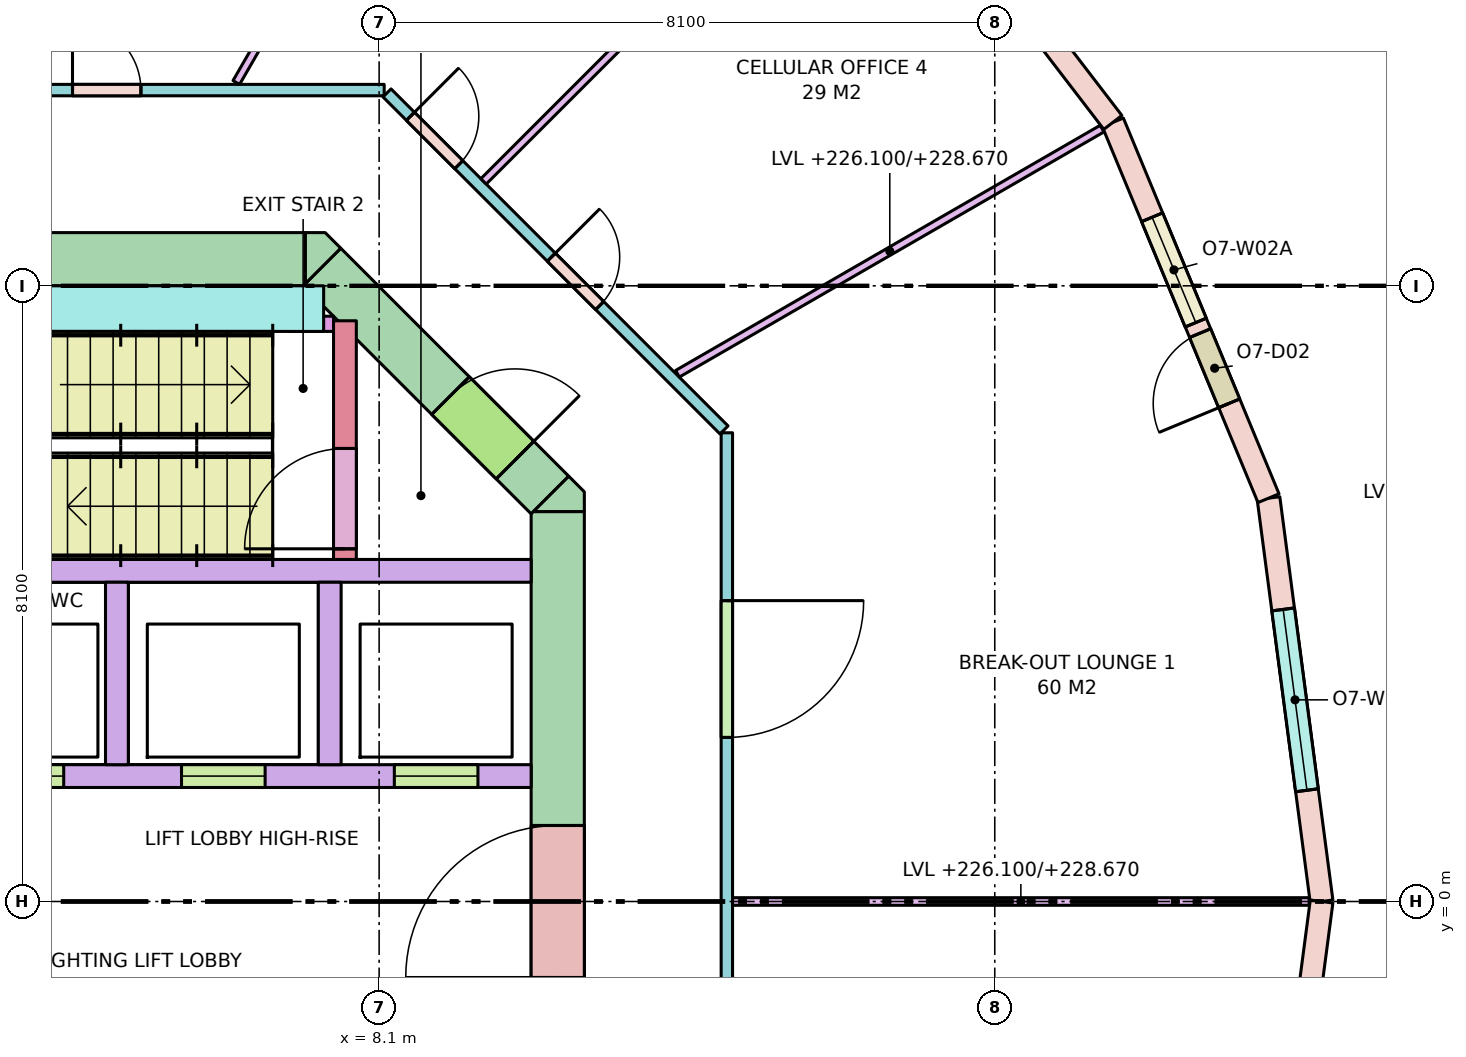
"""IFC4 building model, lengths in metres.
Left out: names, types, materials, properties, quantities, classifications, styles, units other than length and angle.
Written with IfcOpenShell. Run it as: python <this file> out.ifc"""

import sys

from ifc_helpers import new_model, si_unit, direction, frame, frame_2d, origin, place, context, subcontext, project, spatial, polyline, rectangle, outline, extrude, element, fill, save


model = new_model("IFC4")
c1 = context("Model", 3, precision=1e-05, world=origin(), true_north=direction((0.0, 1.0)))
c2 = subcontext(c1, "Body", "Model", "MODEL_VIEW")
j1 = project(units=[si_unit("LENGTHUNIT", "METRE"), si_unit("PLANEANGLEUNIT", "RADIAN")], contexts=[c1])
p1 = place(None, origin())
s1 = spatial("IfcSite", under=j1, at=p1, CompositionType="ELEMENT")
p2 = place(p1, origin())
s2 = spatial("IfcBuilding", under=s1, at=p2, CompositionType="ELEMENT")
p3 = place(p2, frame((0.0, 0.0, 226.1)))
s3 = spatial("IfcBuildingStorey", under=s2, at=p3, CompositionType="ELEMENT", Elevation=226.1)
p4 = place(p3, frame((-7.13, 8.45, -0.28), z_axis=(0.0, 0.0, 1.0), x_axis=(1.0, 0.0, 0.0)))
e1 = element("IfcWall", 1, at=p4, inside=s3, PredefinedType="SHEAR", context=c2, shape_type="SweptSolid", body=[
    extrude(rectangle(XDim=14.26, YDim=0.7, at=frame_2d((7.13, 0.0))), origin(), (0.0, 0.0, 1.0), 3.7),
])
p5 = place(p4, frame((5.48, 0.0, 0.28)))
e2 = element("IfcOpeningElement", 2, at=p5, cuts=e1, PredefinedType="OPENING", context=c2, shape_type="SweptSolid", body=[
    extrude(rectangle(XDim=0.7, YDim=2.1, at=frame_2d((0.35, 1.05))), frame((0.0, 0.36, 0.0), z_axis=(0.0, -1.0, 0.0), x_axis=(1.0, 0.0, 0.0)), (0.0, 0.0, 1.0), 0.72),
])
p6 = place(p4, frame((7.155, 0.0, 0.28)))
e3 = element("IfcOpeningElement", 3, at=p6, cuts=e1, PredefinedType="OPENING", context=c2, shape_type="SweptSolid", body=[
    extrude(rectangle(XDim=0.9, YDim=2.1, at=frame_2d((0.45, 1.05))), frame((0.0, 0.36, 0.0), z_axis=(0.0, -1.0, 0.0), x_axis=(1.0, 0.0, 0.0)), (0.0, 0.0, 1.0), 0.72),
])
p7 = place(p3, frame((10.45, -5.13, -0.28), z_axis=(0.0, 0.0, 1.0), x_axis=(0.0, 1.0, 0.0)))
e4 = element("IfcWall", 4, at=p7, inside=s3, PredefinedType="SHEAR", context=c2, shape_type="SweptSolid", body=[
    extrude(rectangle(XDim=10.26, YDim=0.7, at=frame_2d((5.13, 0.0))), origin(), (0.0, 0.0, 1.0), 3.7),
])
p8 = place(p7, frame((4.13, 0.0, 0.28)))
e5 = element("IfcOpeningElement", 5, at=p8, cuts=e4, PredefinedType="OPENING", context=c2, shape_type="SweptSolid", body=[
    extrude(rectangle(XDim=2.0, YDim=2.1, at=frame_2d((1.0, 1.05))), frame((0.0, 0.36, 0.0), z_axis=(0.0, -1.0, 0.0), x_axis=(1.0, 0.0, 0.0)), (0.0, 0.0, 1.0), 0.72),
])
p9 = place(p3, frame((7.347, 8.347, -0.28), z_axis=(0.0, 0.0, 1.0), x_axis=(0.707106781187, -0.707106781187, 0.0)))
e6 = element("IfcWall", 6, at=p9, inside=s3, PredefinedType="SHEAR", context=c2, shape_type="SweptSolid", body=[
    extrude(rectangle(XDim=4.243, YDim=0.7, at=frame_2d((2.121, 0.0))), origin(), (0.0, 0.0, 1.0), 3.7),
])
p10 = place(p9, frame((2.393, 0.0, 0.28)))
e7 = element("IfcOpeningElement", 7, at=p10, cuts=e6, PredefinedType="OPENING", context=c2, shape_type="SweptSolid", body=[
    extrude(rectangle(XDim=1.2, YDim=2.1, at=frame_2d((0.6, 1.05))), frame((0.0, 0.36, 0.0), z_axis=(0.0, -1.0, 0.0), x_axis=(1.0, 0.0, 0.0)), (0.0, 0.0, 1.0), 0.72),
])
p11 = place(p3, frame((0.0, 0.0, -0.28)))
e8 = element("IfcWall", 8, at=p11, inside=s3, PredefinedType="SHEAR", context=c2, shape_type="SweptSolid", body=[
    extrude(outline(polyline([(10.8, 5.39), (10.8, 5.13), (10.8, 5.13), (10.13, 5.13), (10.595, 5.595), (10.595, 5.595), (10.595, 5.595), (10.8, 5.39)])), origin(), (0.0, 0.0, 1.0), 3.7),
])
p12 = place(p3, frame((0.0, 0.0, -0.28)))
e9 = element("IfcWall", 9, at=p12, inside=s3, PredefinedType="SHEAR", context=c2, shape_type="SweptSolid", body=[
    extrude(outline(polyline([(7.39, 8.8), (7.595, 8.595), (7.595, 8.595), (7.595, 8.595), (7.13, 8.13), (7.13, 8.8), (7.13, 8.8), (7.39, 8.8)])), origin(), (0.0, 0.0, 1.0), 3.7),
])
p13 = place(p3, frame((2.0, 4.35, 0.0), z_axis=(0.0, 0.0, 1.0), x_axis=(1.0, 0.0, 0.0)))
e10 = element("IfcWall", 10, at=p13, inside=s3, PredefinedType="SOLIDWALL", context=c2, shape_type="SweptSolid", body=[
    extrude(rectangle(XDim=8.1, YDim=0.3, at=frame_2d((4.05, 0.0))), origin(), (0.0, 0.0, 1.0), 3.42),
])
p14 = place(p3, frame((2.0, 1.65, 0.0), z_axis=(0.0, 0.0, 1.0), x_axis=(1.0, 0.0, 0.0)))
e11 = element("IfcWall", 11, at=p14, inside=s3, PredefinedType="SOLIDWALL", context=c2, shape_type="SweptSolid", body=[
    extrude(rectangle(XDim=8.1, YDim=0.3, at=frame_2d((4.05, 0.0))), origin(), (0.0, 0.0, 1.0), 3.42),
])
p15 = place(p14, frame((0.85, 0.0, 0.0)))
e12 = element("IfcOpeningElement", 12, at=p15, cuts=e11, PredefinedType="OPENING", context=c2, shape_type="SweptSolid", body=[
    extrude(rectangle(XDim=1.1, YDim=2.1, at=frame_2d((0.55, 1.05))), frame((0.0, 0.16, 0.0), z_axis=(0.0, -1.0, 0.0), x_axis=(1.0, 0.0, 0.0)), (0.0, 0.0, 1.0), 0.32),
])
p16 = place(p14, frame((3.5, 0.0, 0.0)))
e13 = element("IfcOpeningElement", 13, at=p16, cuts=e11, PredefinedType="OPENING", context=c2, shape_type="SweptSolid", body=[
    extrude(rectangle(XDim=1.1, YDim=2.1, at=frame_2d((0.55, 1.05))), frame((0.0, 0.16, 0.0), z_axis=(0.0, -1.0, 0.0), x_axis=(1.0, 0.0, 0.0)), (0.0, 0.0, 1.0), 0.32),
])
p17 = place(p14, frame((6.3, 0.0, 0.0)))
e14 = element("IfcOpeningElement", 14, at=p17, cuts=e11, PredefinedType="OPENING", context=c2, shape_type="SweptSolid", body=[
    extrude(rectangle(XDim=1.1, YDim=2.1, at=frame_2d((0.55, 1.05))), frame((0.0, 0.16, 0.0), z_axis=(0.0, -1.0, 0.0), x_axis=(1.0, 0.0, 0.0)), (0.0, 0.0, 1.0), 0.32),
])
for number, where, z_axis, x_axis in (
    (15, (4.65, 1.8, 0.0), (0.0, 0.0, 1.0), (0.0, 1.0, 0.0)),
    (16, (7.45, 1.8, 0.0), (0.0, 0.0, 1.0), (0.0, 1.0, 0.0)),
):
    element("IfcWall", number, at=place(p3, frame(where, z_axis=z_axis, x_axis=x_axis)), inside=s3, PredefinedType="SOLIDWALL", context=c2, shape_type="SweptSolid", body=[
        extrude(rectangle(XDim=2.4, YDim=0.3, at=frame_2d((1.2, 0.0))), origin(), (0.0, 0.0, 1.0), 3.42),
    ])
p18 = place(p3, frame((7.65, 4.5, 0.0), z_axis=(0.0, 0.0, 1.0), x_axis=(0.0, 1.0, 0.0)))
e17 = element("IfcWall", 17, at=p18, inside=s3, PredefinedType="SHEAR", context=c2, shape_type="SweptSolid", body=[
    extrude(rectangle(XDim=3.14, YDim=0.3, at=frame_2d((1.57, 0.0))), origin(), (0.0, 0.0, 1.0), 3.42),
])
p19 = place(p18, frame((0.14, 0.0, 0.0)))
e18 = element("IfcOpeningElement", 18, at=p19, cuts=e17, PredefinedType="OPENING", context=c2, shape_type="SweptSolid", body=[
    extrude(rectangle(XDim=1.32, YDim=2.1, at=frame_2d((0.66, 1.05))), frame((0.0, 0.16, 0.0), z_axis=(0.0, -1.0, 0.0), x_axis=(1.0, 0.0, 0.0)), (0.0, 0.0, 1.0), 0.32),
])
p20 = place(p3, frame((2.0, 7.8, 0.0), z_axis=(0.0, 0.0, 1.0), x_axis=(1.0, 0.0, 0.0)))
e19 = element("IfcWall", 19, at=p20, inside=s3, PredefinedType="SHEAR", context=c2, shape_type="SweptSolid", body=[
    extrude(rectangle(XDim=5.37, YDim=0.6, at=frame_2d((2.685, 0.0))), origin(), (0.0, 0.0, 1.0), 3.42),
])
p21 = place(p3, frame((6.9, 7.6, 0.0), z_axis=(0.0, 0.0, 1.0), x_axis=(1.0, 0.0, 0.0)))
e20 = element("IfcWall", 20, at=p21, inside=s3, PredefinedType="SHEAR", context=c2, shape_type="SweptSolid", body=[
    extrude(rectangle(XDim=0.6, YDim=0.2, at=frame_2d((0.3, 0.0))), origin(), (0.0, 0.0, 1.0), 3.42),
])
p22 = place(p3, frame((20.5, 0.0, 0.0), z_axis=(0.0, 0.0, 1.0), x_axis=(-0.130517056518, 0.991446064069, 0.0)))
e21 = element("IfcWall", 21, at=p22, inside=s3, PredefinedType="STANDARD", context=c2, shape_type="SweptSolid", body=[
    extrude(rectangle(XDim=5.352, YDim=0.3, at=frame_2d((2.676, 0.0))), origin(), (0.0, 0.0, 1.0), 3.42),
])
p23 = place(p22, frame((1.476, 0.0, 0.8)))
e22 = element("IfcOpeningElement", 22, at=p23, cuts=e21, PredefinedType="OPENING", context=c2, shape_type="SweptSolid", body=[
    extrude(rectangle(XDim=2.4, YDim=2.4, at=frame_2d((1.2, 1.2))), frame((0.0, 0.16, 0.0), z_axis=(0.0, -1.0, 0.0), x_axis=(1.0, 0.0, 0.0)), (0.0, 0.0, 1.0), 0.32),
])
p24 = place(p3, frame((19.802, 5.306, 0.0), z_axis=(0.0, 0.0, 1.0), x_axis=(-0.382713071139, 0.923867255172, 0.0)))
e23 = element("IfcWall", 23, at=p24, inside=s3, PredefinedType="STANDARD", context=c2, shape_type="SweptSolid", body=[
    extrude(rectangle(XDim=5.352, YDim=0.3, at=frame_2d((2.676, 0.0))), origin(), (0.0, 0.0, 1.0), 3.42),
])
p25 = place(p24, frame((1.351, 0.0, 0.0)))
e24 = element("IfcOpeningElement", 24, at=p25, cuts=e23, PredefinedType="OPENING", context=c2, shape_type="SweptSolid", body=[
    extrude(rectangle(XDim=1.0, YDim=2.4, at=frame_2d((0.5, 1.2))), frame((0.0, 0.16, 0.0), z_axis=(0.0, -1.0, 0.0), x_axis=(1.0, 0.0, 0.0)), (0.0, 0.0, 1.0), 0.32),
])
p26 = place(p24, frame((2.501, 0.0, 0.8)))
e25 = element("IfcOpeningElement", 25, at=p26, cuts=e23, PredefinedType="OPENING", context=c2, shape_type="SweptSolid", body=[
    extrude(rectangle(XDim=1.5, YDim=2.4, at=frame_2d((0.75, 1.2))), frame((0.0, 0.16, 0.0), z_axis=(0.0, -1.0, 0.0), x_axis=(1.0, 0.0, 0.0)), (0.0, 0.0, 1.0), 0.32),
])
p27 = place(p3, frame((17.753, 10.25, 0.0), z_axis=(0.0, 0.0, 1.0), x_axis=(-0.60876670321, 0.793349293227, 0.0)))
e26 = element("IfcWall", 26, at=p27, inside=s3, PredefinedType="STANDARD", context=c2, shape_type="SweptSolid", body=[
    extrude(rectangle(XDim=5.352, YDim=0.3, at=frame_2d((2.676, 0.0))), origin(), (0.0, 0.0, 1.0), 3.42),
])
p28 = place(p27, frame((1.476, 0.0, 0.8)))
e27 = element("IfcOpeningElement", 27, at=p28, cuts=e26, PredefinedType="OPENING", context=c2, shape_type="SweptSolid", body=[
    extrude(rectangle(XDim=2.4, YDim=2.4, at=frame_2d((1.2, 1.2))), frame((0.0, 0.16, 0.0), z_axis=(0.0, -1.0, 0.0), x_axis=(1.0, 0.0, 0.0)), (0.0, 0.0, 1.0), 0.32),
])
p29 = place(p3, frame((19.802, -5.306, 0.0), z_axis=(0.0, 0.0, 1.0), x_axis=(0.130517056518, 0.991446064069, 0.0)))
e28 = element("IfcWall", 28, at=p29, inside=s3, PredefinedType="STANDARD", context=c2, shape_type="SweptSolid", body=[
    extrude(rectangle(XDim=5.352, YDim=0.3, at=frame_2d((2.676, 0.0))), origin(), (0.0, 0.0, 1.0), 3.42),
])
p30 = place(p29, frame((1.351, 0.0, 0.0)))
e29 = element("IfcOpeningElement", 29, at=p30, cuts=e28, PredefinedType="OPENING", context=c2, shape_type="SweptSolid", body=[
    extrude(rectangle(XDim=1.0, YDim=2.4, at=frame_2d((0.5, 1.2))), frame((0.0, 0.16, 0.0), z_axis=(0.0, -1.0, 0.0), x_axis=(1.0, 0.0, 0.0)), (0.0, 0.0, 1.0), 0.32),
])
p31 = place(p29, frame((2.501, 0.0, 0.8)))
e30 = element("IfcOpeningElement", 30, at=p31, cuts=e28, PredefinedType="OPENING", context=c2, shape_type="SweptSolid", body=[
    extrude(rectangle(XDim=1.5, YDim=2.4, at=frame_2d((0.75, 1.2))), frame((0.0, 0.16, 0.0), z_axis=(0.0, -1.0, 0.0), x_axis=(1.0, 0.0, 0.0)), (0.0, 0.0, 1.0), 0.32),
])
p32 = place(p3, frame((0.0, 10.675, 0.0), z_axis=(0.0, 0.0, 1.0), x_axis=(1.0, 0.0, 0.0)))
e31 = element("IfcWall", 31, at=p32, inside=s3, PredefinedType="PARTITIONING", context=c2, shape_type="SweptSolid", body=[
    extrude(rectangle(XDim=8.167, YDim=0.15, at=frame_2d((4.083, 0.0))), origin(), (0.0, 0.0, 1.0), 2.57),
])
p33 = place(p32, frame((4.066, 0.0, 0.0)))
e32 = element("IfcOpeningElement", 32, at=p33, cuts=e31, PredefinedType="OPENING", context=c2, shape_type="SweptSolid", body=[
    extrude(rectangle(XDim=0.9, YDim=2.1, at=frame_2d((0.45, 1.05))), frame((0.0, 0.085, 0.0), z_axis=(0.0, -1.0, 0.0), x_axis=(1.0, 0.0, 0.0)), (0.0, 0.0, 1.0), 0.17),
])
p34 = place(p32, frame((1.006, 0.0, 0.0)))
e33 = element("IfcOpeningElement", 33, at=p34, cuts=e31, PredefinedType="OPENING", context=c2, shape_type="SweptSolid", body=[
    extrude(rectangle(XDim=0.9, YDim=2.1, at=frame_2d((0.45, 1.05))), frame((0.0, 0.085, 0.0), z_axis=(0.0, -1.0, 0.0), x_axis=(1.0, 0.0, 0.0)), (0.0, 0.0, 1.0), 0.17),
])
p35 = place(p3, frame((8.204, 10.638, 0.0), z_axis=(0.0, 0.0, 1.0), x_axis=(0.707106781187, -0.707106781187, 0.0)))
e34 = element("IfcWall", 34, at=p35, inside=s3, PredefinedType="PARTITIONING", context=c2, shape_type="SweptSolid", body=[
    extrude(rectangle(XDim=6.271, YDim=0.15, at=frame_2d((3.135, 0.0))), origin(), (0.0, 0.0, 1.0), 2.57),
])
p36 = place(p35, frame((3.057, 0.0, 0.0)))
e35 = element("IfcOpeningElement", 35, at=p36, cuts=e34, PredefinedType="OPENING", context=c2, shape_type="SweptSolid", body=[
    extrude(rectangle(XDim=0.9, YDim=2.1, at=frame_2d((0.45, 1.05))), frame((0.0, 0.085, 0.0), z_axis=(0.0, -1.0, 0.0), x_axis=(1.0, 0.0, 0.0)), (0.0, 0.0, 1.0), 0.17),
])
p37 = place(p35, frame((0.436, 0.0, 0.0)))
e36 = element("IfcOpeningElement", 36, at=p37, cuts=e34, PredefinedType="OPENING", context=c2, shape_type="SweptSolid", body=[
    extrude(rectangle(XDim=0.9, YDim=2.1, at=frame_2d((0.45, 1.05))), frame((0.0, 0.085, 0.0), z_axis=(0.0, -1.0, 0.0), x_axis=(1.0, 0.0, 0.0)), (0.0, 0.0, 1.0), 0.17),
])
p38 = place(p3, frame((12.675, 6.167, 0.0), z_axis=(0.0, 0.0, 1.0), x_axis=(0.0, -1.0, 0.0)))
e37 = element("IfcWall", 37, at=p38, inside=s3, PredefinedType="PARTITIONING", context=c2, shape_type="SweptSolid", body=[
    extrude(rectangle(XDim=12.333, YDim=0.15, at=frame_2d((6.167, 0.0))), origin(), (0.0, 0.0, 1.0), 2.57),
])
p39 = place(p38, frame((10.473, 0.0, 0.0)))
e38 = element("IfcOpeningElement", 38, at=p39, cuts=e37, PredefinedType="OPENING", context=c2, shape_type="SweptSolid", body=[
    extrude(rectangle(XDim=0.9, YDim=2.1, at=frame_2d((0.45, 1.05))), frame((0.0, 0.085, 0.0), z_axis=(0.0, -1.0, 0.0), x_axis=(1.0, 0.0, 0.0)), (0.0, 0.0, 1.0), 0.17),
])
p40 = place(p38, frame((7.416, 0.0, 0.0)))
e39 = element("IfcOpeningElement", 39, at=p40, cuts=e37, PredefinedType="OPENING", context=c2, shape_type="SweptSolid", body=[
    extrude(rectangle(XDim=0.9, YDim=2.1, at=frame_2d((0.45, 1.05))), frame((0.0, 0.085, 0.0), z_axis=(0.0, -1.0, 0.0), x_axis=(1.0, 0.0, 0.0)), (0.0, 0.0, 1.0), 0.17),
])
p41 = place(p38, frame((2.208, 0.0, 0.0)))
e40 = element("IfcOpeningElement", 40, at=p41, cuts=e37, PredefinedType="OPENING", context=c2, shape_type="SweptSolid", body=[
    extrude(rectangle(XDim=1.8, YDim=2.1, at=frame_2d((0.9, 1.05))), frame((0.0, 0.085, 0.0), z_axis=(0.0, -1.0, 0.0), x_axis=(1.0, 0.0, 0.0)), (0.0, 0.0, 1.0), 0.17),
])
p42 = place(p3, frame((12.75, 0.0, 0.0), z_axis=(0.0, 0.0, 1.0), x_axis=(1.0, 0.0, 0.0)))
e41 = element("IfcWall", 41, at=p42, inside=s3, PredefinedType="PARTITIONING", context=c2, shape_type="SweptSolid", body=[
    extrude(rectangle(XDim=7.587, YDim=0.1, at=frame_2d((3.793, 0.0))), origin(), (0.0, 0.0, 1.0), 2.57),
])
p43 = place(p3, frame((12.025, 6.943, 0.0), z_axis=(0.0, 0.0, 1.0), x_axis=(0.866026773083, 0.499997628298, 0.0)))
e42 = element("IfcWall", 42, at=p43, inside=s3, PredefinedType="PARTITIONING", context=c2, shape_type="SweptSolid", body=[
    extrude(rectangle(XDim=6.451, YDim=0.1, at=frame_2d((3.226, 0.0))), origin(), (0.0, 0.0, 1.0), 2.57),
])
p44 = place(p3, frame((9.474, 9.474, 0.0), z_axis=(0.0, 0.0, 1.0), x_axis=(0.707106781187, 0.707106781187, 0.0)))
e43 = element("IfcWall", 43, at=p44, inside=s3, PredefinedType="PARTITIONING", context=c2, shape_type="SweptSolid", body=[
    extrude(rectangle(XDim=6.938, YDim=0.1, at=frame_2d((3.469, 0.0))), origin(), (0.0, 0.0, 1.0), 2.57),
])
p45 = place(p3, frame((6.221, 10.775, 0.0), z_axis=(0.0, 0.0, 1.0), x_axis=(0.500016891966, 0.866015650984, 0.0)))
e44 = element("IfcWall", 44, at=p45, inside=s3, PredefinedType="PARTITIONING", context=c2, shape_type="SweptSolid", body=[
    extrude(rectangle(XDim=7.895, YDim=0.1, at=frame_2d((3.948, 0.0))), origin(), (0.0, 0.0, 1.0), 2.57),
])
p46 = place(p3, frame((2.884, 10.764, 0.0), z_axis=(0.0, 0.0, 1.0), x_axis=(0.258811310764, 0.965927898666, 0.0)))
e45 = element("IfcWall", 45, at=p46, inside=s3, PredefinedType="PARTITIONING", context=c2, shape_type="SweptSolid", body=[
    extrude(rectangle(XDim=9.193, YDim=0.1, at=frame_2d((4.596, 0.0))), origin(), (0.0, 0.0, 1.0), 2.57),
])
p47 = place(p23, origin())
e46 = element("IfcWindow", 46, at=p47, inside=s3, PartitioningType="SINGLE_PANEL", PredefinedType="WINDOW", context=c2, shape_type="SweptSolid", body=[
    extrude(rectangle(XDim=2.4, YDim=2.4, at=frame_2d((1.2, 1.2))), frame((0.0, 0.03, 0.0), z_axis=(0.0, -1.0, 0.0), x_axis=(1.0, 0.0, 0.0)), (0.0, 0.0, 1.0), 0.06),
])
fill(e22, e46)
p48 = place(p25, origin())
e47 = element("IfcDoor", 47, at=p48, inside=s3, OperationType="SINGLE_SWING_LEFT", PredefinedType="DOOR", context=c2, shape_type="SweptSolid", body=[
    extrude(rectangle(XDim=1.0, YDim=2.4, at=frame_2d((0.5, 1.2))), frame((0.0, 0.025, 0.0), z_axis=(0.0, -1.0, 0.0), x_axis=(1.0, 0.0, 0.0)), (0.0, 0.0, 1.0), 0.05),
])
fill(e24, e47)
p49 = place(p26, origin())
e48 = element("IfcWindow", 48, at=p49, inside=s3, PartitioningType="SINGLE_PANEL", PredefinedType="WINDOW", context=c2, shape_type="SweptSolid", body=[
    extrude(rectangle(XDim=1.5, YDim=2.4, at=frame_2d((0.75, 1.2))), frame((0.0, 0.03, 0.0), z_axis=(0.0, -1.0, 0.0), x_axis=(1.0, 0.0, 0.0)), (0.0, 0.0, 1.0), 0.06),
])
fill(e25, e48)
p50 = place(p15, origin())
e49 = element("IfcDoor", 49, at=p50, inside=s3, OperationType="DOUBLE_DOOR_SLIDING", PredefinedType="DOOR", context=c2, shape_type="SweptSolid", body=[
    extrude(rectangle(XDim=1.1, YDim=2.1, at=frame_2d((0.55, 1.05))), frame((0.0, 0.025, 0.0), z_axis=(0.0, -1.0, 0.0), x_axis=(1.0, 0.0, 0.0)), (0.0, 0.0, 1.0), 0.05),
])
fill(e12, e49)
p51 = place(p16, origin())
e50 = element("IfcDoor", 50, at=p51, inside=s3, OperationType="DOUBLE_DOOR_SLIDING", PredefinedType="DOOR", context=c2, shape_type="SweptSolid", body=[
    extrude(rectangle(XDim=1.1, YDim=2.1, at=frame_2d((0.55, 1.05))), frame((0.0, 0.025, 0.0), z_axis=(0.0, -1.0, 0.0), x_axis=(1.0, 0.0, 0.0)), (0.0, 0.0, 1.0), 0.05),
])
fill(e13, e50)
p52 = place(p17, origin())
e51 = element("IfcDoor", 51, at=p52, inside=s3, OperationType="DOUBLE_DOOR_SLIDING", PredefinedType="DOOR", context=c2, shape_type="SweptSolid", body=[
    extrude(rectangle(XDim=1.1, YDim=2.1, at=frame_2d((0.55, 1.05))), frame((0.0, 0.025, 0.0), z_axis=(0.0, -1.0, 0.0), x_axis=(1.0, 0.0, 0.0)), (0.0, 0.0, 1.0), 0.05),
])
fill(e14, e51)
p53 = place(p19, origin())
e52 = element("IfcDoor", 52, at=p53, inside=s3, OperationType="DOUBLE_DOOR_SINGLE_SWING", PredefinedType="DOOR", context=c2, shape_type="SweptSolid", body=[
    extrude(rectangle(XDim=1.32, YDim=2.1, at=frame_2d((0.66, 1.05))), frame((0.0, 0.025, 0.0), z_axis=(0.0, -1.0, 0.0), x_axis=(1.0, 0.0, 0.0)), (0.0, 0.0, 1.0), 0.05),
])
fill(e18, e52)
p54 = place(p10, origin())
e53 = element("IfcDoor", 53, at=p54, inside=s3, OperationType="SINGLE_SWING_RIGHT", PredefinedType="DOOR", context=c2, shape_type="SweptSolid", body=[
    extrude(rectangle(XDim=1.2, YDim=2.1, at=frame_2d((0.6, 1.05))), frame((0.0, 0.025, 0.0), z_axis=(0.0, -1.0, 0.0), x_axis=(1.0, 0.0, 0.0)), (0.0, 0.0, 1.0), 0.05),
])
fill(e7, e53)
p55 = place(p8, origin())
e54 = element("IfcDoor", 54, at=p55, inside=s3, OperationType="DOUBLE_DOOR_SINGLE_SWING", PredefinedType="DOOR", context=c2, shape_type="SweptSolid", body=[
    extrude(rectangle(XDim=2.0, YDim=2.1, at=frame_2d((1.0, 1.05))), frame((0.0, 0.025, 0.0), z_axis=(0.0, -1.0, 0.0), x_axis=(1.0, 0.0, 0.0)), (0.0, 0.0, 1.0), 0.05),
])
fill(e5, e54)
p56 = place(p41, origin())
e55 = element("IfcDoor", 55, at=p56, inside=s3, OperationType="DOUBLE_DOOR_SINGLE_SWING", PredefinedType="DOOR", context=c2, shape_type="SweptSolid", body=[
    extrude(rectangle(XDim=1.8, YDim=2.1, at=frame_2d((0.9, 1.05))), frame((0.0, 0.025, 0.0), z_axis=(0.0, -1.0, 0.0), x_axis=(1.0, 0.0, 0.0)), (0.0, 0.0, 1.0), 0.05),
])
fill(e40, e55)
p57 = place(p36, origin())
e56 = element("IfcDoor", 56, at=p57, inside=s3, OperationType="SINGLE_SWING_LEFT", PredefinedType="DOOR", context=c2, shape_type="SweptSolid", body=[
    extrude(rectangle(XDim=0.9, YDim=2.1, at=frame_2d((0.45, 1.05))), frame((0.0, 0.025, 0.0), z_axis=(0.0, -1.0, 0.0), x_axis=(1.0, 0.0, 0.0)), (0.0, 0.0, 1.0), 0.05),
])
fill(e35, e56)
p58 = place(p37, origin())
e57 = element("IfcDoor", 57, at=p58, inside=s3, OperationType="SINGLE_SWING_LEFT", PredefinedType="DOOR", context=c2, shape_type="SweptSolid", body=[
    extrude(rectangle(XDim=0.9, YDim=2.1, at=frame_2d((0.45, 1.05))), frame((0.0, 0.025, 0.0), z_axis=(0.0, -1.0, 0.0), x_axis=(1.0, 0.0, 0.0)), (0.0, 0.0, 1.0), 0.05),
])
fill(e36, e57)
p59 = place(p33, origin())
e58 = element("IfcDoor", 58, at=p59, inside=s3, OperationType="SINGLE_SWING_LEFT", PredefinedType="DOOR", context=c2, shape_type="SweptSolid", body=[
    extrude(rectangle(XDim=0.9, YDim=2.1, at=frame_2d((0.45, 1.05))), frame((0.0, 0.025, 0.0), z_axis=(0.0, -1.0, 0.0), x_axis=(1.0, 0.0, 0.0)), (0.0, 0.0, 1.0), 0.05),
])
fill(e32, e58)
save(model, sys.argv[1])
